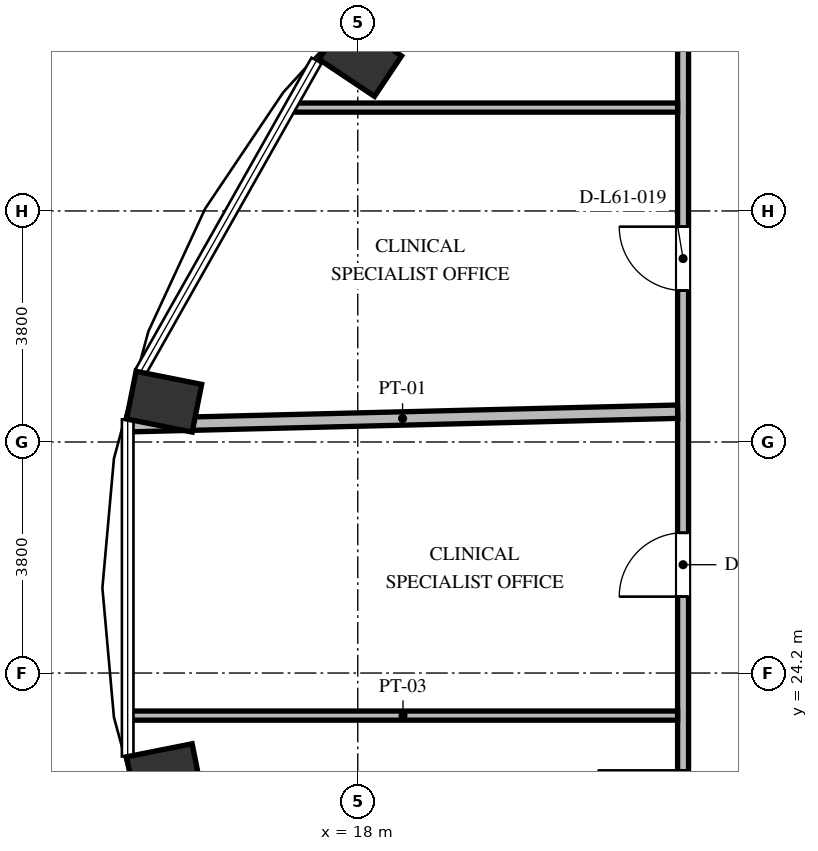
"""IFC4 building model, lengths in metres.
Left out: names, types, materials, properties, quantities, classifications, styles, units other than length and angle.
Written with IfcOpenShell. Run it as: python <this file> out.ifc"""

import sys

from ifc_helpers import new_model, si_unit, direction, frame, frame_2d, origin, origin_2d, place, context, subcontext, project, spatial, rectangle, extrude, element, fill, save


model = new_model("IFC4")
c1 = context("Model", 3, precision=1e-05, world=origin(), true_north=direction((0.0, 1.0)))
c2 = subcontext(c1, "Body", "Model", "MODEL_VIEW")
j1 = project(units=[si_unit("LENGTHUNIT", "METRE"), si_unit("PLANEANGLEUNIT", "RADIAN")], contexts=[c1])
p1 = place(None, origin())
s1 = spatial("IfcSite", under=j1, at=p1, CompositionType="ELEMENT")
p2 = place(p1, origin())
s2 = spatial("IfcBuilding", under=s1, at=p2, CompositionType="ELEMENT")
p3 = place(p2, frame((0.0, 0.0, 234.96)))
s3 = spatial("IfcBuildingStorey", under=s2, at=p3, CompositionType="ELEMENT", Elevation=234.96)
for number, where, z_axis, x_axis in (
    (1, (18.04, 34.323, 0.0), (0.0, 0.0, 1.0), (-0.831, 0.556, 0.0)),
    (2, (14.815, 28.663, 0.0), (0.0, 0.0, 1.0), (-0.981, 0.195, 0.0)),
    (3, (14.815, 22.537, 0.0), (0.0, 0.0, 1.0), (-0.981, -0.195, 0.0)),
):
    element("IfcColumn", number, at=place(p3, frame(where, z_axis=z_axis, x_axis=x_axis)), inside=s3, PredefinedType="COLUMN", context=c2, shape_type="SweptSolid", body=[
        extrude(rectangle(XDim=1.1, YDim=0.8, at=origin_2d()), origin(), (0.0, 0.0, 1.0), 3.648),
    ])
p4 = place(p3, frame((23.35, 19.98, 0.0), z_axis=(0.0, 0.0, 1.0), x_axis=(0.0, 1.0, 0.0)))
e4 = element("IfcWall", 4, at=p4, inside=s3, PredefinedType="PARTITIONING", context=c2, shape_type="SweptSolid", body=[
    extrude(rectangle(XDim=16.042, YDim=0.18, at=frame_2d((8.021, 0.0))), origin(), (0.0, 0.0, 1.0), 3.448),
])
p5 = place(p4, frame((5.477, 0.0, 0.0)))
e5 = element("IfcOpeningElement", 5, at=p5, cuts=e4, PredefinedType="OPENING", context=c2, shape_type="SweptSolid", body=[
    extrude(rectangle(XDim=1.05, YDim=2.15, at=frame_2d((0.525, 1.075))), frame((0.0, 0.1, 0.0), z_axis=(0.0, -1.0, 0.0), x_axis=(1.0, 0.0, 0.0)), (0.0, 0.0, 1.0), 0.2),
])
p6 = place(p4, frame((1.219, 0.0, 0.0)))
e6 = element("IfcOpeningElement", 6, at=p6, cuts=e4, PredefinedType="OPENING", context=c2, shape_type="SweptSolid", body=[
    extrude(rectangle(XDim=1.4, YDim=2.2, at=frame_2d((0.7, 1.1))), frame((0.0, 0.1, 0.0), z_axis=(0.0, -1.0, 0.0), x_axis=(1.0, 0.0, 0.0)), (0.0, 0.0, 1.0), 0.2),
])
p7 = place(p4, frame((10.511, 0.0, 0.0)))
e7 = element("IfcOpeningElement", 7, at=p7, cuts=e4, PredefinedType="OPENING", context=c2, shape_type="SweptSolid", body=[
    extrude(rectangle(XDim=1.05, YDim=2.15, at=frame_2d((0.525, 1.075))), frame((0.0, 0.1, 0.0), z_axis=(0.0, -1.0, 0.0), x_axis=(1.0, 0.0, 0.0)), (0.0, 0.0, 1.0), 0.2),
])
p8 = place(p3, frame((14.228, 23.5, 0.0), z_axis=(0.0, 0.0, 1.0), x_axis=(1.0, 0.0, 0.0)))
e8 = element("IfcWall", 8, at=p8, inside=s3, PredefinedType="PARTITIONING", context=c2, shape_type="SweptSolid", body=[
    extrude(rectangle(XDim=9.032, YDim=0.15, at=frame_2d((4.516, 0.0))), origin(), (0.0, 0.0, 1.0), 3.448),
])
p9 = place(p3, frame((14.213, 28.275, 0.0), z_axis=(0.0, 0.0, 1.0), x_axis=(0.99969661311, 0.024630910184, 0.0)))
e9 = element("IfcWall", 9, at=p9, inside=s3, PredefinedType="PARTITIONING", context=c2, shape_type="SweptSolid", body=[
    extrude(rectangle(XDim=9.05, YDim=0.22, at=frame_2d((4.525, 0.0))), origin(), (0.0, 0.0, 1.0), 3.448),
])
p10 = place(p3, frame((16.895, 33.5, 0.0), z_axis=(0.0, 0.0, 1.0), x_axis=(1.0, 0.0, 0.0)))
e10 = element("IfcWall", 10, at=p10, inside=s3, PredefinedType="PARTITIONING", context=c2, shape_type="SweptSolid", body=[
    extrude(rectangle(XDim=6.365, YDim=0.15, at=frame_2d((3.183, 0.0))), origin(), (0.0, 0.0, 1.0), 3.448),
])
p11 = place(p5, origin())
e11 = element("IfcDoor", 11, at=p11, inside=s3, OperationType="SINGLE_SWING_LEFT", PredefinedType="DOOR", context=c2, shape_type="SweptSolid", body=[
    extrude(rectangle(XDim=1.05, YDim=2.15, at=frame_2d((0.525, 1.075))), frame((0.0, 0.025, 0.0), z_axis=(0.0, -1.0, 0.0), x_axis=(1.0, 0.0, 0.0)), (0.0, 0.0, 1.0), 0.05),
])
fill(e5, e11)
p12 = place(p6, origin())
e12 = element("IfcDoor", 12, at=p12, inside=s3, OperationType="SINGLE_SWING_RIGHT", PredefinedType="DOOR", context=c2, shape_type="SweptSolid", body=[
    extrude(rectangle(XDim=1.4, YDim=2.2, at=frame_2d((0.7, 1.1))), frame((0.0, 0.025, 0.0), z_axis=(0.0, -1.0, 0.0), x_axis=(1.0, 0.0, 0.0)), (0.0, 0.0, 1.0), 0.05),
])
fill(e6, e12)
p13 = place(p7, origin())
e13 = element("IfcDoor", 13, at=p13, inside=s3, OperationType="SINGLE_SWING_RIGHT", PredefinedType="DOOR", context=c2, shape_type="SweptSolid", body=[
    extrude(rectangle(XDim=1.05, YDim=2.15, at=frame_2d((0.525, 1.075))), frame((0.0, 0.025, 0.0), z_axis=(0.0, -1.0, 0.0), x_axis=(1.0, 0.0, 0.0)), (0.0, 0.0, 1.0), 0.05),
])
fill(e7, e13)
save(model, sys.argv[1])
